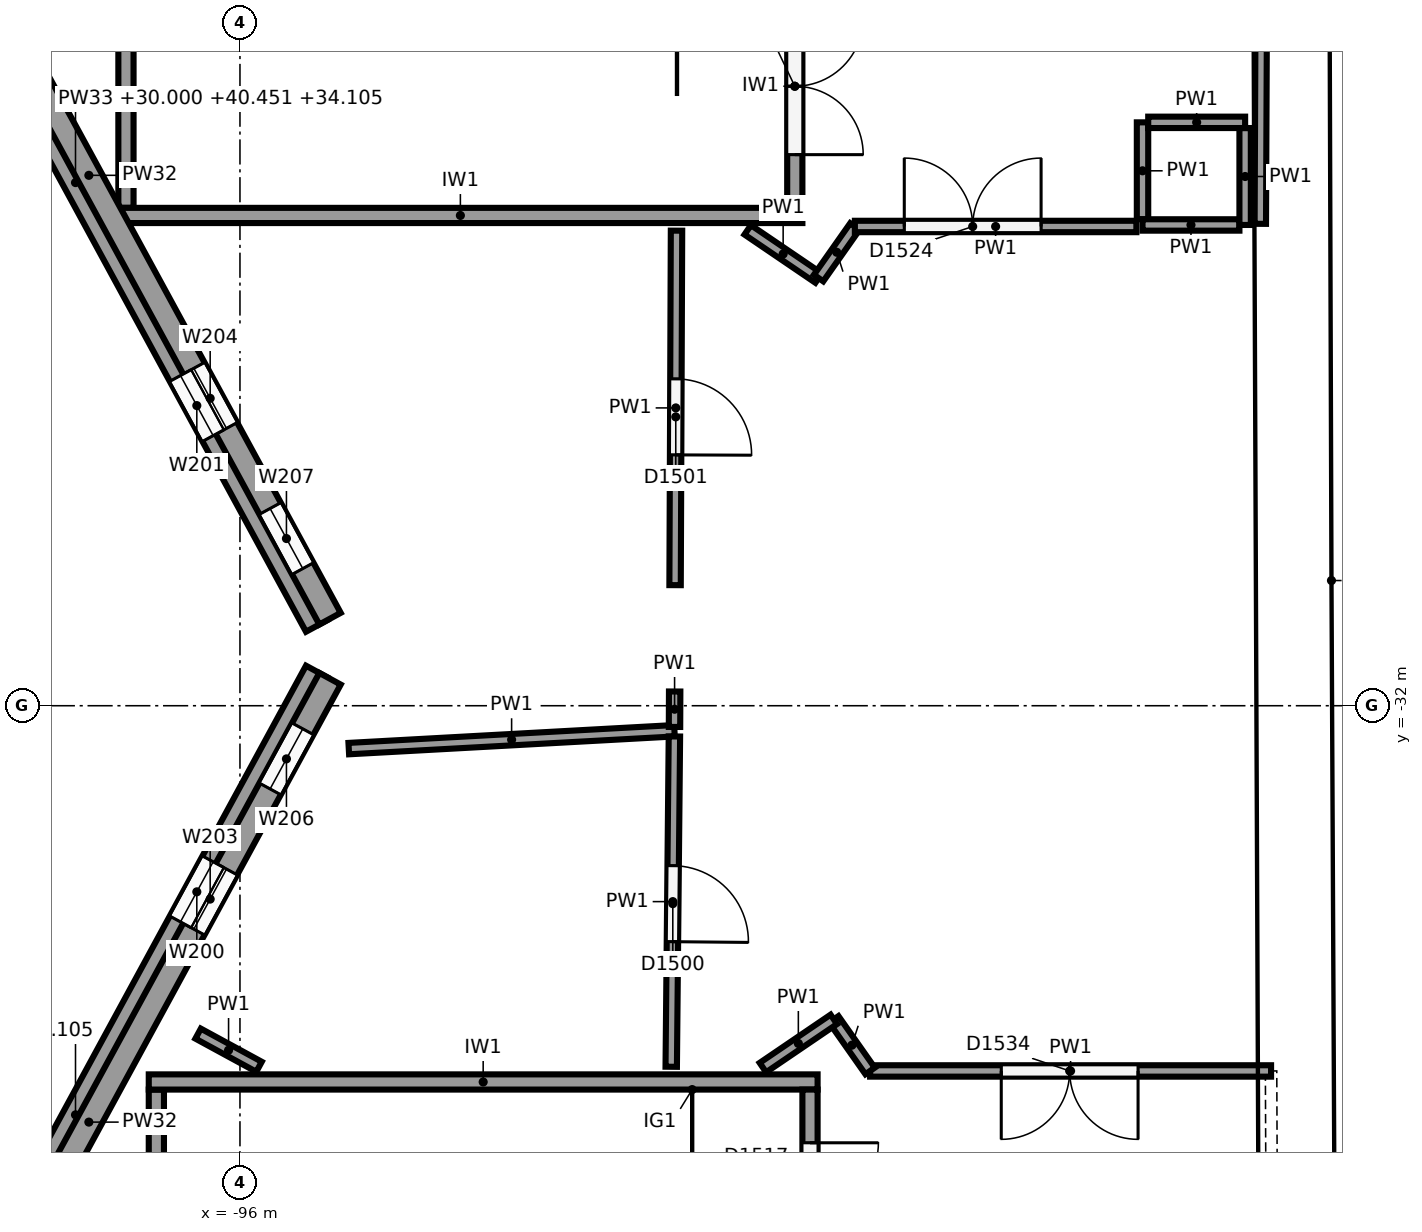
"""IFC4 building model, lengths in metres.
Left out: names, types, materials, properties, quantities, classifications, styles, units other than length and angle.
Written with IfcOpenShell. Run it as: python <this file> out.ifc"""

import sys

from ifc_helpers import new_model, si_unit, direction, frame, frame_2d, origin, origin_2d, place, context, subcontext, project, spatial, polyline, rectangle, circle, outline, extrude, element, fill, save


model = new_model("IFC4")
c1 = context("Model", 3, precision=1e-05, world=origin(), true_north=direction((0.0, 1.0)))
c2 = subcontext(c1, "Body", "Model", "MODEL_VIEW")
j1 = project(units=[si_unit("LENGTHUNIT", "METRE"), si_unit("PLANEANGLEUNIT", "RADIAN")], contexts=[c1])
p1 = place(None, origin())
s1 = spatial("IfcSite", under=j1, at=p1, CompositionType="ELEMENT")
p2 = place(p1, origin())
s2 = spatial("IfcBuilding", under=s1, at=p2, CompositionType="ELEMENT")
p3 = place(p2, frame((0.0, 0.0, 24.0)))
s3 = spatial("IfcBuildingStorey", under=s2, at=p3, CompositionType="ELEMENT", Elevation=24.0)
p4 = place(p3, frame((-84.925, -30.682, 0.0), z_axis=(0.0, 0.0, 1.0), x_axis=(1.0, 0.0, 0.0)))
e1 = element("IfcColumn", 1, at=p4, inside=s3, PredefinedType="COLUMN", context=c2, shape_type="SweptSolid", body=[
    extrude(circle(Radius=0.5, at=origin_2d()), origin(), (0.0, 0.0, 1.0), 6.0),
])
p5 = place(p3, frame((-94.6, -31.25, 0.0), z_axis=(0.0, 0.0, 1.0), x_axis=(1.0, 0.0, 0.0)))
e2 = element("IfcColumn", 2, at=p5, inside=s3, PredefinedType="COLUMN", context=c2, shape_type="SweptSolid", body=[
    extrude(circle(Radius=0.45, at=origin_2d()), origin(), (0.0, 0.0, 1.0), 6.0),
])
p6 = place(p3, frame((-94.815, -30.855, 0.0), z_axis=(0.0, 0.0, 1.0), x_axis=(-0.477867771117, 0.878431780691, 0.0)))
e3 = element("IfcWall", 3, at=p6, inside=s3, PredefinedType="SOLIDWALL", context=c2, shape_type="SweptSolid", body=[
    extrude(rectangle(XDim=13.28, YDim=0.32, at=frame_2d((6.64, 0.0))), origin(), (0.0, 0.0, 1.0), 6.0),
])
p7 = place(p6, frame((0.75, 0.0, 1.0)))
e4 = element("IfcOpeningElement", 4, at=p7, cuts=e3, PredefinedType="OPENING", context=c2, shape_type="SweptSolid", body=[
    extrude(rectangle(XDim=0.9, YDim=3.25, at=frame_2d((0.45, 1.625))), frame((0.0, 0.17, 0.0), z_axis=(0.0, -1.0, 0.0), x_axis=(1.0, 0.0, 0.0)), (0.0, 0.0, 1.0), 0.34),
])
p8 = place(p6, frame((2.85, 0.0, 1.0)))
e5 = element("IfcOpeningElement", 5, at=p8, cuts=e3, PredefinedType="OPENING", context=c2, shape_type="SweptSolid", body=[
    extrude(rectangle(XDim=0.9, YDim=3.25, at=frame_2d((0.45, 1.625))), frame((0.0, 0.17, 0.0), z_axis=(0.0, -1.0, 0.0), x_axis=(1.0, 0.0, 0.0)), (0.0, 0.0, 1.0), 0.34),
])
p9 = place(p6, frame((11.25, 0.0, 1.0)))
e6 = element("IfcOpeningElement", 6, at=p9, cuts=e3, PredefinedType="OPENING", context=c2, shape_type="SweptSolid", body=[
    extrude(rectangle(XDim=0.9, YDim=3.25, at=frame_2d((0.45, 1.625))), frame((0.0, 0.17, 0.0), z_axis=(0.0, -1.0, 0.0), x_axis=(1.0, 0.0, 0.0)), (0.0, 0.0, 1.0), 0.34),
])
p10 = place(p3, frame((-94.991, -30.95, 6.0), z_axis=(0.0, 0.0, 1.0), x_axis=(-0.477867771117, 0.878431780691, 0.0)))
e7 = element("IfcWall", 7, at=p10, inside=s3, PredefinedType="SOLIDWALL", context=c2, shape_type="SweptSolid", body=[
    extrude(outline(polyline([(0.0, 0.0), (13.28, 0.0), (13.28, 10.451), (0.0, 4.105), (0.0, 0.0)])), frame((0.0, 0.16, 0.0), z_axis=(0.0, -1.0, 0.0), x_axis=(1.0, 0.0, 0.0)), (0.0, 0.0, 1.0), 0.32),
])
p11 = place(p10, frame((2.85, 0.0, 1.6)))
e8 = element("IfcOpeningElement", 8, at=p11, cuts=e7, PredefinedType="OPENING", context=c2, shape_type="SweptSolid", body=[
    extrude(rectangle(XDim=0.9, YDim=3.0, at=frame_2d((0.45, 1.5))), frame((0.0, 0.17, 0.0), z_axis=(0.0, -1.0, 0.0), x_axis=(1.0, 0.0, 0.0)), (0.0, 0.0, 1.0), 0.34),
])
p12 = place(p10, frame((11.25, 0.0, 1.6)))
e9 = element("IfcOpeningElement", 9, at=p12, cuts=e7, PredefinedType="OPENING", context=c2, shape_type="SweptSolid", body=[
    extrude(rectangle(XDim=0.9, YDim=3.0, at=frame_2d((0.45, 1.5))), frame((0.0, 0.17, 0.0), z_axis=(0.0, -1.0, 0.0), x_axis=(1.0, 0.0, 0.0)), (0.0, 0.0, 1.0), 0.34),
])
p13 = place(p3, frame((-101.161, -43.311, 0.0), z_axis=(0.0, 0.0, 1.0), x_axis=(0.477867771117, 0.878431780691, 0.0)))
e10 = element("IfcWall", 10, at=p13, inside=s3, PredefinedType="SOLIDWALL", context=c2, shape_type="SweptSolid", body=[
    extrude(rectangle(XDim=13.28, YDim=0.32, at=frame_2d((6.64, 0.0))), origin(), (0.0, 0.0, 1.0), 6.0),
])
p14 = place(p13, frame((11.63, 0.0, 1.0)))
e11 = element("IfcOpeningElement", 11, at=p14, cuts=e10, PredefinedType="OPENING", context=c2, shape_type="SweptSolid", body=[
    extrude(rectangle(XDim=0.9, YDim=3.25, at=frame_2d((0.45, 1.625))), frame((0.0, 0.17, 0.0), z_axis=(0.0, -1.0, 0.0), x_axis=(1.0, 0.0, 0.0)), (0.0, 0.0, 1.0), 0.34),
])
p15 = place(p13, frame((9.53, 0.0, 1.0)))
e12 = element("IfcOpeningElement", 12, at=p15, cuts=e10, PredefinedType="OPENING", context=c2, shape_type="SweptSolid", body=[
    extrude(rectangle(XDim=0.9, YDim=3.25, at=frame_2d((0.45, 1.625))), frame((0.0, 0.17, 0.0), z_axis=(0.0, -1.0, 0.0), x_axis=(1.0, 0.0, 0.0)), (0.0, 0.0, 1.0), 0.34),
])
p16 = place(p13, frame((1.13, 0.0, 1.0)))
e13 = element("IfcOpeningElement", 13, at=p16, cuts=e10, PredefinedType="OPENING", context=c2, shape_type="SweptSolid", body=[
    extrude(rectangle(XDim=0.9, YDim=3.25, at=frame_2d((0.45, 1.625))), frame((0.0, 0.17, 0.0), z_axis=(0.0, -1.0, 0.0), x_axis=(1.0, 0.0, 0.0)), (0.0, 0.0, 1.0), 0.34),
])
p17 = place(p3, frame((-101.337, -43.215, 6.0), z_axis=(0.0, 0.0, 1.0), x_axis=(0.477867771117, 0.878431780691, 0.0)))
e14 = element("IfcWall", 14, at=p17, inside=s3, PredefinedType="SOLIDWALL", context=c2, shape_type="SweptSolid", body=[
    extrude(outline(polyline([(0.0, 0.0), (13.28, 0.0), (13.28, 4.105), (0.0, 10.451), (0.0, 0.0)])), frame((0.0, 0.16, 0.0), z_axis=(0.0, -1.0, 0.0), x_axis=(1.0, 0.0, 0.0)), (0.0, 0.0, 1.0), 0.32),
])
p18 = place(p17, frame((9.53, 0.0, 1.6)))
e15 = element("IfcOpeningElement", 15, at=p18, cuts=e14, PredefinedType="OPENING", context=c2, shape_type="SweptSolid", body=[
    extrude(rectangle(XDim=0.9, YDim=3.0, at=frame_2d((0.45, 1.5))), frame((0.0, 0.17, 0.0), z_axis=(0.0, -1.0, 0.0), x_axis=(1.0, 0.0, 0.0)), (0.0, 0.0, 1.0), 0.34),
])
p19 = place(p17, frame((1.13, 0.0, 1.6)))
e16 = element("IfcOpeningElement", 16, at=p19, cuts=e14, PredefinedType="OPENING", context=c2, shape_type="SweptSolid", body=[
    extrude(rectangle(XDim=0.9, YDim=3.0, at=frame_2d((0.45, 1.5))), frame((0.0, 0.17, 0.0), z_axis=(0.0, -1.0, 0.0), x_axis=(1.0, 0.0, 0.0)), (0.0, 0.0, 1.0), 0.34),
])
p20 = place(p3, frame((-97.6, -25.55, 0.0), z_axis=(0.0, 0.0, 1.0), x_axis=(1.0, 0.0, 0.0)))
e17 = element("IfcWall", 17, at=p20, inside=s3, PredefinedType="SHEAR", context=c2, shape_type="SweptSolid", body=[
    extrude(rectangle(XDim=9.0, YDim=0.2, at=frame_2d((4.5, 0.0))), origin(), (0.0, 0.0, 1.0), 5.75),
])
p21 = place(p3, frame((-97.5, -18.85, 0.0), z_axis=(0.0, 0.0, 1.0), x_axis=(0.0, -1.0, 0.0)))
e18 = element("IfcWall", 18, at=p21, inside=s3, PredefinedType="SHEAR", context=c2, shape_type="SweptSolid", body=[
    extrude(rectangle(XDim=6.6, YDim=0.2, at=frame_2d((3.3, 0.0))), origin(), (0.0, 0.0, 1.0), 5.75),
])
p22 = place(p3, frame((-88.7, -22.25, 0.0), z_axis=(0.0, 0.0, 1.0), x_axis=(0.0, -1.0, 0.0)))
e19 = element("IfcWall", 19, at=p22, inside=s3, PredefinedType="SHEAR", context=c2, shape_type="SweptSolid", body=[
    extrude(rectangle(XDim=3.2, YDim=0.2, at=frame_2d((1.6, 0.0))), origin(), (0.0, 0.0, 1.0), 5.75),
])
p23 = place(p22, frame((0.7, 0.0, 0.0)))
e20 = element("IfcOpeningElement", 20, at=p23, cuts=e19, PredefinedType="OPENING", context=c2, shape_type="SweptSolid", body=[
    extrude(rectangle(XDim=1.8, YDim=2.1, at=frame_2d((0.9, 1.05))), frame((0.0, 0.11, 0.0), z_axis=(0.0, -1.0, 0.0), x_axis=(1.0, 0.0, 0.0)), (0.0, 0.0, 1.0), 0.22),
])
p24 = place(p3, frame((-97.2, -36.95, 0.0), z_axis=(0.0, 0.0, 1.0), x_axis=(1.0, 0.0, 0.0)))
e21 = element("IfcWall", 21, at=p24, inside=s3, PredefinedType="SHEAR", context=c2, shape_type="SweptSolid", body=[
    extrude(rectangle(XDim=8.8, YDim=0.2, at=frame_2d((4.4, 0.0))), origin(), (0.0, 0.0, 1.0), 5.75),
])
p25 = place(p3, frame((-97.1, -37.05, 0.0), z_axis=(0.0, 0.0, 1.0), x_axis=(0.0, -1.0, 0.0)))
e22 = element("IfcWall", 22, at=p25, inside=s3, PredefinedType="SHEAR", context=c2, shape_type="SweptSolid", body=[
    extrude(rectangle(XDim=6.6, YDim=0.2, at=frame_2d((3.3, 0.0))), origin(), (0.0, 0.0, 1.0), 5.75),
])
p26 = place(p3, frame((-88.5, -37.05, 0.0), z_axis=(0.0, 0.0, 1.0), x_axis=(0.0, -1.0, 0.0)))
e23 = element("IfcWall", 23, at=p26, inside=s3, PredefinedType="SHEAR", context=c2, shape_type="SweptSolid", body=[
    extrude(rectangle(XDim=3.2, YDim=0.2, at=frame_2d((1.6, 0.0))), origin(), (0.0, 0.0, 1.0), 5.75),
])
p27 = place(p26, frame((0.7, 0.0, 0.0)))
e24 = element("IfcOpeningElement", 24, at=p27, cuts=e23, PredefinedType="OPENING", context=c2, shape_type="SweptSolid", body=[
    extrude(rectangle(XDim=1.8, YDim=2.1, at=frame_2d((0.9, 1.05))), frame((0.0, 0.11, 0.0), z_axis=(0.0, -1.0, 0.0), x_axis=(1.0, 0.0, 0.0)), (0.0, 0.0, 1.0), 0.22),
])
p28 = place(p3, frame((-95.749, -36.75, 0.0), z_axis=(0.0, 0.0, 1.0), x_axis=(-0.878487841863, 0.477764703279, 0.0)))
e25 = element("IfcWall", 25, at=p28, inside=s3, PredefinedType="PARTITIONING", context=c2, shape_type="SweptSolid", body=[
    extrude(rectangle(XDim=0.913, YDim=0.15, at=frame_2d((0.456, 0.0))), origin(), (0.0, 0.0, 1.0), 5.4),
])
p29 = place(p3, frame((-94.568, -32.564, 0.0), z_axis=(0.0, 0.0, 1.0), x_axis=(0.998498275679, 0.054783149469, 0.0)))
e26 = element("IfcWall", 26, at=p29, inside=s3, PredefinedType="PARTITIONING", context=c2, shape_type="SweptSolid", body=[
    extrude(rectangle(XDim=4.292, YDim=0.15, at=frame_2d((2.146, 0.0))), origin(), (0.0, 0.0, 1.0), 5.4),
])
p30 = place(p3, frame((-90.284, -32.404, 0.0), z_axis=(0.0, 0.0, 1.0), x_axis=(-0.009662470257, -0.999953317245, 0.0)))
e27 = element("IfcWall", 27, at=p30, inside=s3, PredefinedType="PARTITIONING", context=c2, shape_type="SweptSolid", body=[
    extrude(rectangle(XDim=4.346, YDim=0.15, at=frame_2d((2.173, 0.0))), origin(), (0.0, 0.0, 1.0), 5.4),
])
p31 = place(p30, frame((1.7, 0.0, 0.0)))
e28 = element("IfcOpeningElement", 28, at=p31, cuts=e27, PredefinedType="OPENING", context=c2, shape_type="SweptSolid", body=[
    extrude(rectangle(XDim=1.0, YDim=2.1, at=frame_2d((0.5, 1.05))), frame((0.0, 0.085, 0.0), z_axis=(0.0, -1.0, 0.0), x_axis=(1.0, 0.0, 0.0)), (0.0, 0.0, 1.0), 0.17),
])
p32 = place(p3, frame((-90.256, -25.75, 0.0), z_axis=(0.0, 0.0, 1.0), x_axis=(-0.004030747762, -0.999991876503, 0.0)))
e29 = element("IfcWall", 29, at=p32, inside=s3, PredefinedType="PARTITIONING", context=c2, shape_type="SweptSolid", body=[
    extrude(rectangle(XDim=4.664, YDim=0.15, at=frame_2d((2.332, 0.0))), origin(), (0.0, 0.0, 1.0), 5.4),
])
p33 = place(p32, frame((1.95, 0.0, 0.0)))
e30 = element("IfcOpeningElement", 30, at=p33, cuts=e29, PredefinedType="OPENING", context=c2, shape_type="SweptSolid", body=[
    extrude(rectangle(XDim=1.0, YDim=2.1, at=frame_2d((0.5, 1.05))), frame((0.0, 0.085, 0.0), z_axis=(0.0, -1.0, 0.0), x_axis=(1.0, 0.0, 0.0)), (0.0, 0.0, 1.0), 0.17),
])
p34 = place(p3, frame((-90.281, -31.813, 0.0), z_axis=(0.0, 0.0, 1.0), x_axis=(-0.004188444936, -0.999991228426, 0.0)))
e31 = element("IfcWall", 31, at=p34, inside=s3, PredefinedType="PARTITIONING", context=c2, shape_type="SweptSolid", body=[
    extrude(rectangle(XDim=0.466, YDim=0.15, at=frame_2d((0.233, 0.0))), origin(), (0.0, 0.0, 1.0), 5.4),
])
p35 = place(p3, frame((-84.125, -24.325, 0.0), z_axis=(0.0, 0.0, 1.0), x_axis=(0.0, -1.0, 0.0)))
e32 = element("IfcWall", 32, at=p35, inside=s3, PredefinedType="PARTITIONING", context=c2, shape_type="SweptSolid", body=[
    extrude(rectangle(XDim=1.275, YDim=0.15, at=frame_2d((0.638, 0.0))), origin(), (0.0, 0.0, 1.0), 5.4),
])
p36 = place(p3, frame((-84.125, -25.675, 0.0), z_axis=(0.0, 0.0, 1.0), x_axis=(1.0, 0.0, 0.0)))
e33 = element("IfcWall", 33, at=p36, inside=s3, PredefinedType="PARTITIONING", context=c2, shape_type="SweptSolid", body=[
    extrude(rectangle(XDim=1.275, YDim=0.15, at=frame_2d((0.637, 0.0))), origin(), (0.0, 0.0, 1.0), 5.4),
])
for number, where, z_axis, x_axis in (
    (34, (-82.775, -25.675, 0.0), (0.0, 0.0, 1.0), (0.0, 1.0, 0.0)),
    (35, (-82.775, -24.325, 0.0), (0.0, 0.0, 1.0), (-1.0, 0.0, 0.0)),
):
    element("IfcWall", number, at=place(p3, frame(where, z_axis=z_axis, x_axis=x_axis)), inside=s3, PredefinedType="PARTITIONING", context=c2, shape_type="SweptSolid", body=[
        extrude(rectangle(XDim=1.275, YDim=0.15, at=frame_2d((0.638, 0.0))), origin(), (0.0, 0.0, 1.0), 5.4),
    ])
p37 = place(p3, frame((-89.32, -25.74, 0.0), z_axis=(0.0, 0.0, 1.0), x_axis=(0.827055308354, -0.562120553728, 0.0)))
e36 = element("IfcWall", 36, at=p37, inside=s3, PredefinedType="PARTITIONING", context=c2, shape_type="SweptSolid", body=[
    extrude(rectangle(XDim=1.128, YDim=0.15, at=frame_2d((0.564, 0.0))), origin(), (0.0, 0.0, 1.0), 5.4),
])
p38 = place(p3, frame((-88.387, -26.374, 0.0), z_axis=(0.0, 0.0, 1.0), x_axis=(0.575376756214, 0.817888493872, 0.0)))
e37 = element("IfcWall", 37, at=p38, inside=s3, PredefinedType="PARTITIONING", context=c2, shape_type="SweptSolid", body=[
    extrude(rectangle(XDim=0.83, YDim=0.15, at=frame_2d((0.415, 0.0))), origin(), (0.0, 0.0, 1.0), 5.4),
])
p39 = place(p3, frame((-87.909, -25.695, 0.0), z_axis=(0.0, 0.0, 1.0), x_axis=(1.0, 0.0, 0.0)))
e38 = element("IfcWall", 38, at=p39, inside=s3, PredefinedType="PARTITIONING", context=c2, shape_type="SweptSolid", body=[
    extrude(rectangle(XDim=3.704, YDim=0.15, at=frame_2d((1.852, 0.0))), origin(), (0.0, 0.0, 1.0), 5.4),
])
p40 = place(p39, frame((0.65, 0.0, 0.0)))
e39 = element("IfcOpeningElement", 39, at=p40, cuts=e38, PredefinedType="OPENING", context=c2, shape_type="SweptSolid", body=[
    extrude(rectangle(XDim=1.8, YDim=2.1, at=frame_2d((0.9, 1.05))), frame((0.0, 0.085, 0.0), z_axis=(0.0, -1.0, 0.0), x_axis=(1.0, 0.0, 0.0)), (0.0, 0.0, 1.0), 0.17),
])
p41 = place(p3, frame((-82.575, -25.66, 0.0), z_axis=(0.0, 0.0, 1.0), x_axis=(0.004334608277, 0.999990605541, 0.0)))
e40 = element("IfcWall", 40, at=p41, inside=s3, PredefinedType="PARTITIONING", context=c2, shape_type="SweptSolid", body=[
    extrude(rectangle(XDim=13.856, YDim=0.15, at=frame_2d((6.928, 0.0))), origin(), (0.0, 0.0, 1.0), 5.4),
])
p42 = place(p3, frame((-82.38, -49.417, 0.0), z_axis=(0.0, 0.0, 1.0), x_axis=(-0.004239136529, 0.99999101482, 0.0)))
e41 = element("IfcWall", 41, at=p42, inside=s3, PredefinedType="PARTITIONING", context=c2, shape_type="SweptSolid", body=[
    extrude(rectangle(XDim=12.613, YDim=0.15, at=frame_2d((6.306, 0.0))), origin(), (0.0, 0.0, 1.0), 5.4),
])
p43 = place(p3, frame((-82.434, -36.805, 0.0), z_axis=(0.0, 0.0, 1.0), x_axis=(-1.0, 0.0, 0.0)))
e42 = element("IfcWall", 42, at=p43, inside=s3, PredefinedType="PARTITIONING", context=c2, shape_type="SweptSolid", body=[
    extrude(rectangle(XDim=5.276, YDim=0.15, at=frame_2d((2.638, 0.0))), origin(), (0.0, 0.0, 1.0), 5.4),
])
p44 = place(p43, frame((1.75, 0.0, 0.0)))
e43 = element("IfcOpeningElement", 43, at=p44, cuts=e42, PredefinedType="OPENING", context=c2, shape_type="SweptSolid", body=[
    extrude(rectangle(XDim=1.8, YDim=2.1, at=frame_2d((0.9, 1.05))), frame((0.0, 0.085, 0.0), z_axis=(0.0, -1.0, 0.0), x_axis=(1.0, 0.0, 0.0)), (0.0, 0.0, 1.0), 0.17),
])
p45 = place(p3, frame((-87.709, -36.805, 0.0), z_axis=(0.0, 0.0, 1.0), x_axis=(-0.575573582652, 0.81774999294, 0.0)))
e44 = element("IfcWall", 44, at=p45, inside=s3, PredefinedType="PARTITIONING", context=c2, shape_type="SweptSolid", body=[
    extrude(rectangle(XDim=0.83, YDim=0.15, at=frame_2d((0.415, 0.0))), origin(), (0.0, 0.0, 1.0), 5.4),
])
p46 = place(p3, frame((-88.187, -36.126, 0.0), z_axis=(0.0, 0.0, 1.0), x_axis=(-0.827055308354, -0.562120553728, 0.0)))
e45 = element("IfcWall", 45, at=p46, inside=s3, PredefinedType="PARTITIONING", context=c2, shape_type="SweptSolid", body=[
    extrude(rectangle(XDim=1.128, YDim=0.15, at=frame_2d((0.564, 0.0))), origin(), (0.0, 0.0, 1.0), 5.4),
])
p47 = place(p7, origin())
e46 = element("IfcWindow", 46, at=p47, inside=s3, PartitioningType="SINGLE_PANEL", PredefinedType="WINDOW", context=c2, shape_type="SweptSolid", body=[
    extrude(rectangle(XDim=0.9, YDim=3.25, at=frame_2d((0.45, 1.625))), frame((0.0, 0.03, 0.0), z_axis=(0.0, -1.0, 0.0), x_axis=(1.0, 0.0, 0.0)), (0.0, 0.0, 1.0), 0.06),
])
fill(e4, e46)
p48 = place(p8, origin())
e47 = element("IfcWindow", 47, at=p48, inside=s3, PartitioningType="SINGLE_PANEL", PredefinedType="WINDOW", context=c2, shape_type="SweptSolid", body=[
    extrude(rectangle(XDim=0.9, YDim=3.25, at=frame_2d((0.45, 1.625))), frame((0.0, 0.03, 0.0), z_axis=(0.0, -1.0, 0.0), x_axis=(1.0, 0.0, 0.0)), (0.0, 0.0, 1.0), 0.06),
])
fill(e5, e47)
p49 = place(p11, origin())
e48 = element("IfcWindow", 48, at=p49, inside=s3, PartitioningType="SINGLE_PANEL", PredefinedType="WINDOW", context=c2, shape_type="SweptSolid", body=[
    extrude(rectangle(XDim=0.9, YDim=3.0, at=frame_2d((0.45, 1.5))), frame((0.0, 0.03, 0.0), z_axis=(0.0, -1.0, 0.0), x_axis=(1.0, 0.0, 0.0)), (0.0, 0.0, 1.0), 0.06),
])
fill(e8, e48)
p50 = place(p14, origin())
e49 = element("IfcWindow", 49, at=p50, inside=s3, PartitioningType="SINGLE_PANEL", PredefinedType="WINDOW", context=c2, shape_type="SweptSolid", body=[
    extrude(rectangle(XDim=0.9, YDim=3.25, at=frame_2d((0.45, 1.625))), frame((0.0, 0.03, 0.0), z_axis=(0.0, -1.0, 0.0), x_axis=(1.0, 0.0, 0.0)), (0.0, 0.0, 1.0), 0.06),
])
fill(e11, e49)
p51 = place(p15, origin())
e50 = element("IfcWindow", 50, at=p51, inside=s3, PartitioningType="SINGLE_PANEL", PredefinedType="WINDOW", context=c2, shape_type="SweptSolid", body=[
    extrude(rectangle(XDim=0.9, YDim=3.25, at=frame_2d((0.45, 1.625))), frame((0.0, 0.03, 0.0), z_axis=(0.0, -1.0, 0.0), x_axis=(1.0, 0.0, 0.0)), (0.0, 0.0, 1.0), 0.06),
])
fill(e12, e50)
p52 = place(p18, origin())
e51 = element("IfcWindow", 51, at=p52, inside=s3, PartitioningType="SINGLE_PANEL", PredefinedType="WINDOW", context=c2, shape_type="SweptSolid", body=[
    extrude(rectangle(XDim=0.9, YDim=3.0, at=frame_2d((0.45, 1.5))), frame((0.0, 0.03, 0.0), z_axis=(0.0, -1.0, 0.0), x_axis=(1.0, 0.0, 0.0)), (0.0, 0.0, 1.0), 0.06),
])
fill(e15, e51)
p53 = place(p23, origin())
e52 = element("IfcDoor", 52, at=p53, inside=s3, OperationType="DOUBLE_DOOR_SINGLE_SWING", PredefinedType="DOOR", context=c2, shape_type="SweptSolid", body=[
    extrude(rectangle(XDim=1.8, YDim=2.1, at=frame_2d((0.9, 1.05))), frame((0.0, 0.025, 0.0), z_axis=(0.0, -1.0, 0.0), x_axis=(1.0, 0.0, 0.0)), (0.0, 0.0, 1.0), 0.05),
])
fill(e20, e52)
p54 = place(p27, origin())
e53 = element("IfcDoor", 53, at=p54, inside=s3, OperationType="DOUBLE_DOOR_SINGLE_SWING", PredefinedType="DOOR", context=c2, shape_type="SweptSolid", body=[
    extrude(rectangle(XDim=1.8, YDim=2.1, at=frame_2d((0.9, 1.05))), frame((0.0, 0.025, 0.0), z_axis=(0.0, -1.0, 0.0), x_axis=(1.0, 0.0, 0.0)), (0.0, 0.0, 1.0), 0.05),
])
fill(e24, e53)
p55 = place(p31, origin())
e54 = element("IfcDoor", 54, at=p55, inside=s3, OperationType="SINGLE_SWING_RIGHT", PredefinedType="DOOR", context=c2, shape_type="SweptSolid", body=[
    extrude(rectangle(XDim=1.0, YDim=2.1, at=frame_2d((0.5, 1.05))), frame((0.0, 0.025, 0.0), z_axis=(0.0, -1.0, 0.0), x_axis=(1.0, 0.0, 0.0)), (0.0, 0.0, 1.0), 0.05),
])
fill(e28, e54)
p56 = place(p33, origin())
e55 = element("IfcDoor", 55, at=p56, inside=s3, OperationType="SINGLE_SWING_RIGHT", PredefinedType="DOOR", context=c2, shape_type="SweptSolid", body=[
    extrude(rectangle(XDim=1.0, YDim=2.1, at=frame_2d((0.5, 1.05))), frame((0.0, 0.025, 0.0), z_axis=(0.0, -1.0, 0.0), x_axis=(1.0, 0.0, 0.0)), (0.0, 0.0, 1.0), 0.05),
])
fill(e30, e55)
p57 = place(p40, origin())
e56 = element("IfcDoor", 56, at=p57, inside=s3, OperationType="DOUBLE_DOOR_SINGLE_SWING", PredefinedType="DOOR", context=c2, shape_type="SweptSolid", body=[
    extrude(rectangle(XDim=1.8, YDim=2.1, at=frame_2d((0.9, 1.05))), frame((0.0, 0.025, 0.0), z_axis=(0.0, -1.0, 0.0), x_axis=(1.0, 0.0, 0.0)), (0.0, 0.0, 1.0), 0.05),
])
fill(e39, e56)
p58 = place(p44, origin())
e57 = element("IfcDoor", 57, at=p58, inside=s3, OperationType="DOUBLE_DOOR_SINGLE_SWING", PredefinedType="DOOR", context=c2, shape_type="SweptSolid", body=[
    extrude(rectangle(XDim=1.8, YDim=2.1, at=frame_2d((0.9, 1.05))), frame((0.0, 0.025, 0.0), z_axis=(0.0, -1.0, 0.0), x_axis=(1.0, 0.0, 0.0)), (0.0, 0.0, 1.0), 0.05),
])
fill(e43, e57)
save(model, sys.argv[1])
